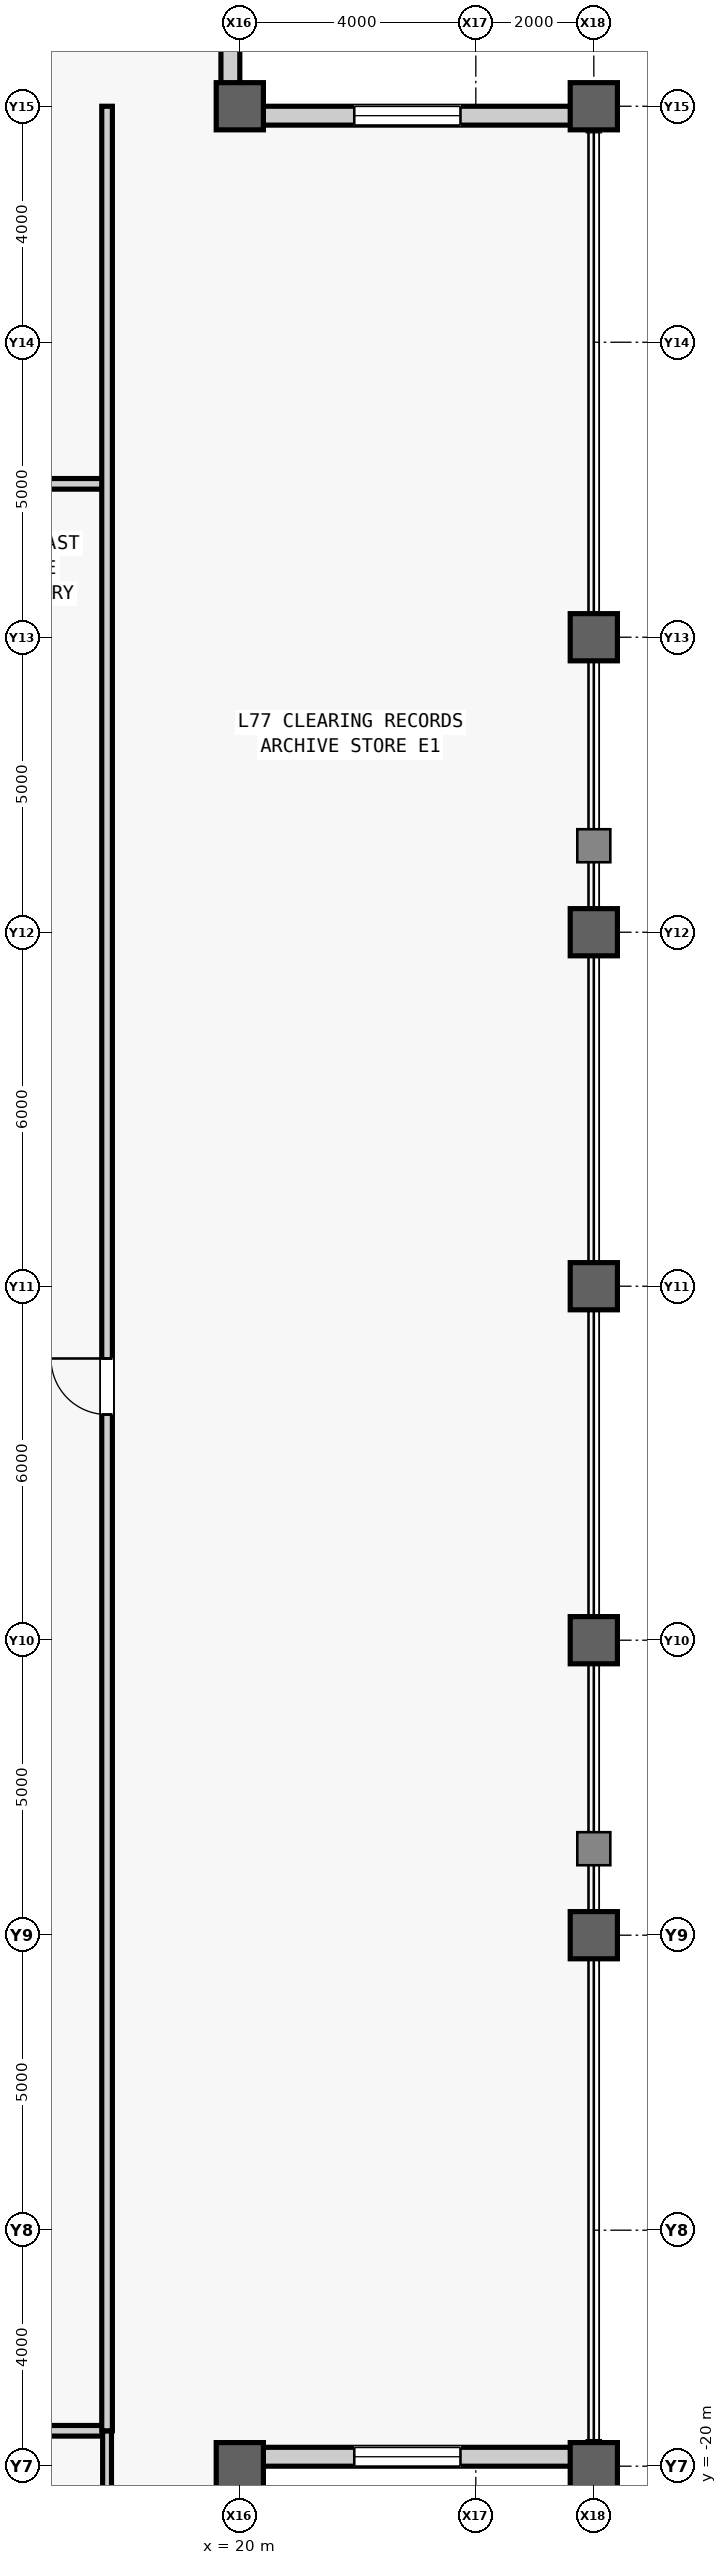
"""IFC4 building model, lengths in metres.
Left out: names, types, materials, properties, quantities, classifications, styles, units other than length and angle.
Written with IfcOpenShell. Run it as: python <this file> out.ifc"""

import sys

from ifc_helpers import new_model, si_unit, direction, frame, frame_2d, origin, origin_2d, place, context, subcontext, project, spatial, rectangle, hollow_rectangle, extrude, source, transform, mapped, element, fill, save


model = new_model("IFC4")
c1 = context("Model", 3, precision=1e-05, world=origin(), true_north=direction((0.0, 1.0)))
c2 = subcontext(c1, "Body", "Model", "MODEL_VIEW")
j1 = project(units=[si_unit("LENGTHUNIT", "METRE"), si_unit("PLANEANGLEUNIT", "RADIAN")], contexts=[c1])
p1 = place(None, origin())
s1 = spatial("IfcSite", under=j1, at=p1, CompositionType="ELEMENT")
p2 = place(p1, origin())
s2 = spatial("IfcBuilding", under=s1, at=p2, CompositionType="ELEMENT")
p3 = place(p2, frame((0.0, 0.0, 326.3)))
s3 = spatial("IfcBuildingStorey", under=s2, at=p3, CompositionType="ELEMENT", Elevation=326.3)
m1 = source(origin(), c2, "Body", "SweptSolid", [
    extrude(hollow_rectangle(XDim=0.8, YDim=0.8, WallThickness=0.045, at=origin_2d()), origin(), (0.0, 0.0, 1.0), 4.0),
])
for number, where, z_axis, x_axis in (
    (1, (20.0, -20.0, 0.0), (0.0, 0.0, 1.0), (1.0, 0.0, 0.0)),
    (2, (20.0, 20.0, 0.0), (0.0, 0.0, 1.0), (1.0, 0.0, 0.0)),
    (3, (26.0, -20.0, 0.0), (0.0, 0.0, 1.0), (1.0, 0.0, 0.0)),
    (4, (26.0, -11.0, 0.0), (0.0, 0.0, 1.0), (1.0, 0.0, 0.0)),
    (5, (26.0, -6.0, 0.0), (0.0, 0.0, 1.0), (1.0, 0.0, 0.0)),
    (6, (26.0, 0.0, 0.0), (0.0, 0.0, 1.0), (1.0, 0.0, 0.0)),
    (7, (26.0, 6.0, 0.0), (0.0, 0.0, 1.0), (1.0, 0.0, 0.0)),
    (8, (26.0, 11.0, 0.0), (0.0, 0.0, 1.0), (1.0, 0.0, 0.0)),
    (9, (26.0, 20.0, 0.0), (0.0, 0.0, 1.0), (1.0, 0.0, 0.0)),
):
    element("IfcColumn", number, at=place(p3, frame(where, z_axis=z_axis, x_axis=x_axis)), inside=s3, PredefinedType="COLUMN", context=c2, shape_type="MappedRepresentation", body=[
        mapped(m1, transform((0.0, 0.0, 0.0), scale=1.0)),
    ])
m2 = source(origin(), c2, "Body", "SweptSolid", [
    extrude(rectangle(XDim=5.68, YDim=0.32, at=frame_2d((2.84, 0.0))), origin(), (0.0, 0.0, 1.0), 3.191),
])
p4 = place(p3, frame((19.84, -25.68, 0.0), z_axis=(0.0, 0.0, 1.0), x_axis=(0.0, 1.0, 0.0)))
e10 = element("IfcWall", 10, at=p4, inside=s3, PredefinedType="STANDARD", context=c2, shape_type="MappedRepresentation", body=[
    mapped(m2, transform((0.0, 0.0, 0.0), scale=1.0)),
])
m3 = source(origin(), c2, "Body", "SweptSolid", [
    extrude(rectangle(XDim=1.8, YDim=2.4, at=frame_2d((0.9, 1.2))), frame((0.0, 0.17, 0.0), z_axis=(0.0, -1.0, 0.0), x_axis=(1.0, 0.0, 0.0)), (0.0, 0.0, 1.0), 0.34),
])
p5 = place(p4, frame((1.94, 0.0, 0.5)))
e11 = element("IfcOpeningElement", 11, at=p5, cuts=e10, PredefinedType="OPENING", context=c2, shape_type="MappedRepresentation", body=[
    mapped(m3, transform((0.0, 0.0, 0.0), scale=1.0)),
])
p6 = place(p3, frame((20.0, -19.84, 0.0), z_axis=(0.0, 0.0, 1.0), x_axis=(1.0, 0.0, 0.0)))
e12 = element("IfcWall", 12, at=p6, inside=s3, PredefinedType="STANDARD", context=c2, shape_type="MappedRepresentation", body=[
    mapped(m2, transform((0.0, 0.0, 0.0), scale=1.0)),
])
p7 = place(p6, frame((1.94, 0.0, 0.5)))
e13 = element("IfcOpeningElement", 13, at=p7, cuts=e12, PredefinedType="OPENING", context=c2, shape_type="MappedRepresentation", body=[
    mapped(m3, transform((0.0, 0.0, 0.0), scale=1.0)),
])
p8 = place(p3, frame((20.0, 19.84, 0.0), z_axis=(0.0, 0.0, 1.0), x_axis=(1.0, 0.0, 0.0)))
e14 = element("IfcWall", 14, at=p8, inside=s3, PredefinedType="STANDARD", context=c2, shape_type="MappedRepresentation", body=[
    mapped(m2, transform((0.0, 0.0, 0.0), scale=1.0)),
])
p9 = place(p8, frame((1.94, 0.0, 0.5)))
e15 = element("IfcOpeningElement", 15, at=p9, cuts=e14, PredefinedType="OPENING", context=c2, shape_type="MappedRepresentation", body=[
    mapped(m3, transform((0.0, 0.0, 0.0), scale=1.0)),
])
p10 = place(p3, frame((19.84, 20.0, 0.0), z_axis=(0.0, 0.0, 1.0), x_axis=(0.0, 1.0, 0.0)))
e16 = element("IfcWall", 16, at=p10, inside=s3, PredefinedType="STANDARD", context=c2, shape_type="MappedRepresentation", body=[
    mapped(m2, transform((0.0, 0.0, 0.0), scale=1.0)),
])
p11 = place(p10, frame((1.94, 0.0, 0.5)))
e17 = element("IfcOpeningElement", 17, at=p11, cuts=e16, PredefinedType="OPENING", context=c2, shape_type="MappedRepresentation", body=[
    mapped(m3, transform((0.0, 0.0, 0.0), scale=1.0)),
])
m4 = source(origin(), c2, "Body", "SweptSolid", [
    extrude(rectangle(XDim=2.4, YDim=0.18, at=frame_2d((1.2, 0.0))), origin(), (0.0, 0.0, 1.0), 3.74),
])
p12 = place(p3, frame((15.35, 13.6, 0.0), z_axis=(0.0, 0.0, 1.0), x_axis=(1.0, 0.0, 0.0)))
e18 = element("IfcWall", 18, at=p12, inside=s3, PredefinedType="PARTITIONING", context=c2, shape_type="MappedRepresentation", body=[
    mapped(m4, transform((0.0, 0.0, 0.0), scale=1.0)),
])
m5 = source(origin(), c2, "Body", "SweptSolid", [
    extrude(rectangle(XDim=36.3, YDim=0.18, at=frame_2d((18.15, 0.0))), origin(), (0.0, 0.0, 1.0), 3.393),
])
p13 = place(p3, frame((-18.55, -19.4, 0.0), z_axis=(0.0, 0.0, 1.0), x_axis=(1.0, 0.0, 0.0)))
e19 = element("IfcWall", 19, at=p13, inside=s3, PredefinedType="PARTITIONING", context=c2, shape_type="MappedRepresentation", body=[
    mapped(m5, transform((0.0, 0.0, 0.0), scale=1.0)),
])
m6 = source(origin(), c2, "Body", "SweptSolid", [
    extrude(rectangle(XDim=1.05, YDim=2.2, at=frame_2d((0.525, 1.1))), frame((0.0, 0.1, 0.0), z_axis=(0.0, -1.0, 0.0), x_axis=(1.0, 0.0, 0.0)), (0.0, 0.0, 1.0), 0.2),
])
p14 = place(p13, frame((17.6, 0.0, 0.0)))
e20 = element("IfcOpeningElement", 20, at=p14, cuts=e19, PredefinedType="OPENING", context=c2, shape_type="MappedRepresentation", body=[
    mapped(m6, transform((0.0, 0.0, 0.0), scale=1.0)),
])
m7 = source(origin(), c2, "Body", "SweptSolid", [
    extrude(rectangle(XDim=6.6, YDim=0.15, at=frame_2d((3.3, 0.0))), origin(), (0.0, 0.0, 1.0), 3.74),
])
p15 = place(p3, frame((17.75, -26.0, 0.0), z_axis=(0.0, 0.0, 1.0), x_axis=(0.0, 1.0, 0.0)))
e21 = element("IfcWall", 21, at=p15, inside=s3, PredefinedType="PARTITIONING", context=c2, shape_type="MappedRepresentation", body=[
    mapped(m7, transform((0.0, 0.0, 0.0), scale=1.0)),
])
m8 = source(origin(), c2, "Body", "SweptSolid", [
    extrude(rectangle(XDim=39.4, YDim=0.18, at=frame_2d((19.7, 0.0))), origin(), (0.0, 0.0, 1.0), 3.74),
])
p16 = place(p3, frame((17.75, -19.4, 0.0), z_axis=(0.0, 0.0, 1.0), x_axis=(0.0, 1.0, 0.0)))
e22 = element("IfcWall", 22, at=p16, inside=s3, PredefinedType="PARTITIONING", context=c2, shape_type="MappedRepresentation", body=[
    mapped(m8, transform((0.0, 0.0, 0.0), scale=1.0)),
])
m9 = source(origin(), c2, "Body", "SweptSolid", [
    extrude(rectangle(XDim=0.95, YDim=2.15, at=frame_2d((0.475, 1.075))), frame((0.0, 0.1, 0.0), z_axis=(0.0, -1.0, 0.0), x_axis=(1.0, 0.0, 0.0)), (0.0, 0.0, 1.0), 0.2),
])
p17 = place(p16, frame((17.225, 0.0, 0.0)))
e23 = element("IfcOpeningElement", 23, at=p17, cuts=e22, PredefinedType="OPENING", context=c2, shape_type="MappedRepresentation", body=[
    mapped(m9, transform((0.0, 0.0, 0.0), scale=1.0)),
])
m10 = source(origin(), c2, "Body", "SweptSolid", [
    extrude(rectangle(XDim=1.8, YDim=2.4, at=frame_2d((0.9, 1.2))), frame((0.0, 0.03, 0.0), z_axis=(0.0, -1.0, 0.0), x_axis=(1.0, 0.0, 0.0)), (0.0, 0.0, 1.0), 0.06),
])
p18 = place(p7, origin())
e24 = element("IfcWindow", 24, at=p18, inside=s3, PartitioningType="SINGLE_PANEL", PredefinedType="WINDOW", context=c2, shape_type="MappedRepresentation", body=[
    mapped(m10, transform((0.0, 0.0, 0.0), scale=1.0)),
])
fill(e13, e24)
p19 = place(p9, origin())
e25 = element("IfcWindow", 25, at=p19, inside=s3, PartitioningType="SINGLE_PANEL", PredefinedType="WINDOW", context=c2, shape_type="MappedRepresentation", body=[
    mapped(m10, transform((0.0, 0.0, 0.0), scale=1.0)),
])
fill(e15, e25)
m11 = source(origin(), c2, "Body", "SweptSolid", [
    extrude(rectangle(XDim=0.95, YDim=2.15, at=frame_2d((0.475, 1.075))), frame((0.0, 0.025, 0.0), z_axis=(0.0, -1.0, 0.0), x_axis=(1.0, 0.0, 0.0)), (0.0, 0.0, 1.0), 0.05),
])
p20 = place(p17, origin())
e26 = element("IfcDoor", 26, at=p20, inside=s3, OperationType="SINGLE_SWING_RIGHT", PredefinedType="DOOR", context=c2, shape_type="MappedRepresentation", body=[
    mapped(m11, transform((0.0, 0.0, 0.0), scale=1.0)),
])
fill(e23, e26)
save(model, sys.argv[1])
